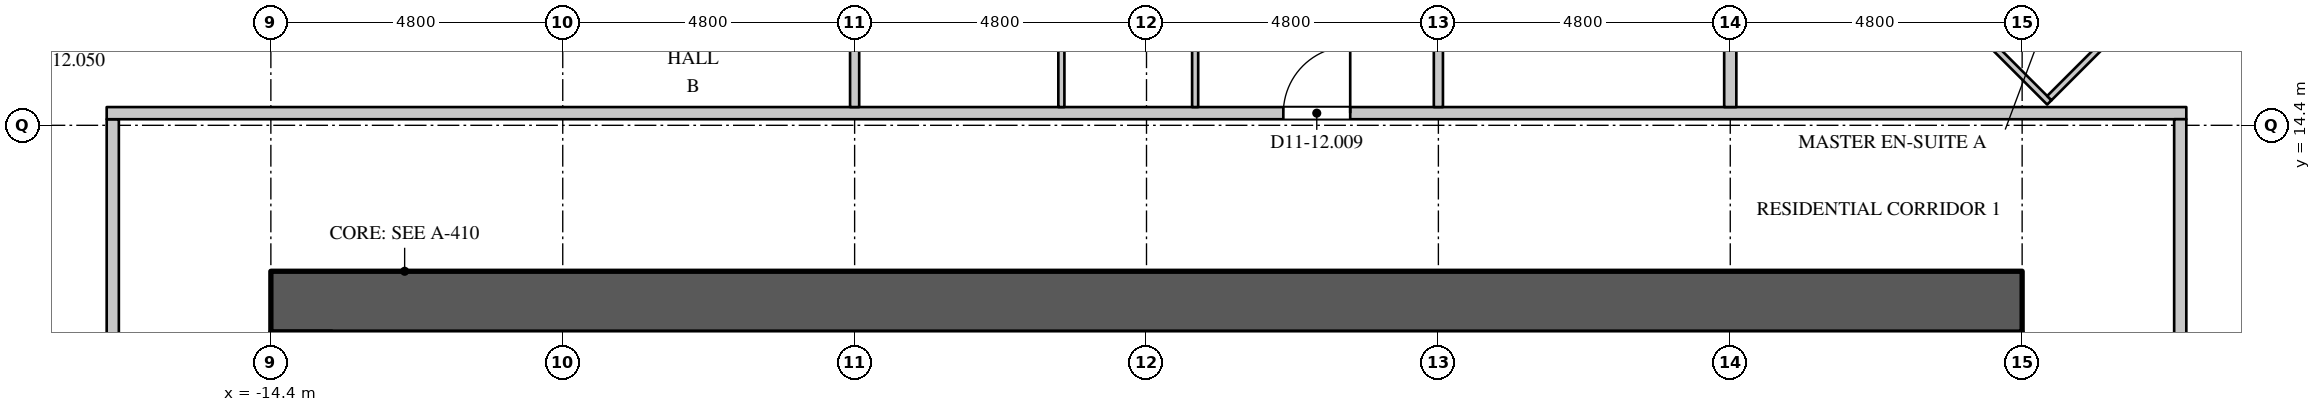
"""IFC4 building model, lengths in metres.
Left out: names, types, materials, properties, quantities, classifications, styles, units other than length and angle.
Written with IfcOpenShell. Run it as: python <this file> out.ifc"""

import sys

from ifc_helpers import new_model, si_unit, direction, frame, frame_2d, origin, place, context, subcontext, project, spatial, rectangle, extrude, element, fill, save


model = new_model("IFC4")
c1 = context("Model", 3, precision=1e-05, world=origin(), true_north=direction((0.0, 1.0)))
c2 = subcontext(c1, "Body", "Model", "MODEL_VIEW")
j1 = project(units=[si_unit("LENGTHUNIT", "METRE"), si_unit("PLANEANGLEUNIT", "RADIAN")], contexts=[c1])
p1 = place(None, origin())
s1 = spatial("IfcSite", under=j1, at=p1, CompositionType="ELEMENT")
p2 = place(p1, origin())
s2 = spatial("IfcBuilding", under=s1, at=p2, CompositionType="ELEMENT")
p3 = place(p2, frame((0.0, 0.0, 50.7)))
s3 = spatial("IfcBuildingStorey", under=s2, at=p3, CompositionType="ELEMENT", Elevation=50.7)
p4 = place(p3, frame((-14.4, 11.5, 0.0), z_axis=(0.0, 0.0, 1.0), x_axis=(1.0, 0.0, 0.0)))
e1 = element("IfcWall", 1, at=p4, inside=s3, PredefinedType="SHEAR", context=c2, shape_type="SweptSolid", body=[
    extrude(rectangle(XDim=28.8, YDim=1.0, at=frame_2d((14.4, 0.0))), origin(), (0.0, 0.0, 1.0), 4.2),
])
p5 = place(p3, frame((-17.0, -14.5, 0.0), z_axis=(0.0, 0.0, 1.0), x_axis=(0.0, 1.0, 0.0)))
e2 = element("IfcWall", 2, at=p5, inside=s3, PredefinedType="PARTITIONING", context=c2, shape_type="SweptSolid", body=[
    extrude(rectangle(XDim=29.0, YDim=0.2, at=frame_2d((14.5, 0.0))), origin(), (0.0, 0.0, 1.0), 3.95),
])
p6 = place(p5, frame((11.55, 0.0, 0.0)))
e3 = element("IfcOpeningElement", 3, at=p6, cuts=e2, PredefinedType="OPENING", context=c2, shape_type="SweptSolid", body=[
    extrude(rectangle(XDim=1.1, YDim=2.4, at=frame_2d((0.55, 1.2))), frame((0.0, 0.11, 0.0), z_axis=(0.0, -1.0, 0.0), x_axis=(1.0, 0.0, 0.0)), (0.0, 0.0, 1.0), 0.22),
])
p7 = place(p3, frame((-17.1, 14.6, 0.0), z_axis=(0.0, 0.0, 1.0), x_axis=(1.0, 0.0, 0.0)))
e4 = element("IfcWall", 4, at=p7, inside=s3, PredefinedType="PARTITIONING", context=c2, shape_type="SweptSolid", body=[
    extrude(rectangle(XDim=34.2, YDim=0.2, at=frame_2d((17.1, 0.0))), origin(), (0.0, 0.0, 1.0), 3.95),
])
p8 = place(p7, frame((19.35, 0.0, 0.0)))
e5 = element("IfcOpeningElement", 5, at=p8, cuts=e4, PredefinedType="OPENING", context=c2, shape_type="SweptSolid", body=[
    extrude(rectangle(XDim=1.1, YDim=2.4, at=frame_2d((0.55, 1.2))), frame((0.0, 0.11, 0.0), z_axis=(0.0, -1.0, 0.0), x_axis=(1.0, 0.0, 0.0)), (0.0, 0.0, 1.0), 0.22),
])
p9 = place(p3, frame((17.0, -14.5, 0.0), z_axis=(0.0, 0.0, 1.0), x_axis=(0.0, 1.0, 0.0)))
e6 = element("IfcWall", 6, at=p9, inside=s3, PredefinedType="PARTITIONING", context=c2, shape_type="SweptSolid", body=[
    extrude(rectangle(XDim=29.0, YDim=0.2, at=frame_2d((14.5, 0.0))), origin(), (0.0, 0.0, 1.0), 3.95),
])
p10 = place(p9, frame((16.4, 0.0, 0.0)))
e7 = element("IfcOpeningElement", 7, at=p10, cuts=e6, PredefinedType="OPENING", context=c2, shape_type="SweptSolid", body=[
    extrude(rectangle(XDim=1.1, YDim=2.4, at=frame_2d((0.55, 1.2))), frame((0.0, 0.11, 0.0), z_axis=(0.0, -1.0, 0.0), x_axis=(1.0, 0.0, 0.0)), (0.0, 0.0, 1.0), 0.22),
])
p11 = place(p3, frame((-22.747, 11.968, 0.0), z_axis=(0.0, 0.0, 1.0), x_axis=(0.707106781187, 0.707106781187, 0.0)))
e8 = element("IfcWall", 8, at=p11, inside=s3, PredefinedType="PARTITIONING", context=c2, shape_type="SweptSolid", body=[
    extrude(rectangle(XDim=9.913, YDim=0.15, at=frame_2d((4.957, 0.0))), origin(), (0.0, 0.0, 1.0), 3.95),
])
p12 = place(p11, frame((4.45, 0.0, 0.0)))
e9 = element("IfcOpeningElement", 9, at=p12, cuts=e8, PredefinedType="OPENING", context=c2, shape_type="SweptSolid", body=[
    extrude(rectangle(XDim=0.95, YDim=2.2, at=frame_2d((0.475, 1.1))), frame((0.0, 0.085, 0.0), z_axis=(0.0, -1.0, 0.0), x_axis=(1.0, 0.0, 0.0)), (0.0, 0.0, 1.0), 0.17),
])
p13 = place(p11, frame((8.35, 0.0, 0.0)))
e10 = element("IfcOpeningElement", 10, at=p13, cuts=e8, PredefinedType="OPENING", context=c2, shape_type="SweptSolid", body=[
    extrude(rectangle(XDim=0.95, YDim=2.2, at=frame_2d((0.475, 1.1))), frame((0.0, 0.085, 0.0), z_axis=(0.0, -1.0, 0.0), x_axis=(1.0, 0.0, 0.0)), (0.0, 0.0, 1.0), 0.17),
])
p14 = place(p3, frame((-4.8, 14.7, 0.0), z_axis=(0.0, 0.0, 1.0), x_axis=(0.0, 1.0, 0.0)))
e11 = element("IfcWall", 11, at=p14, inside=s3, PredefinedType="PARTITIONING", context=c2, shape_type="SweptSolid", body=[
    extrude(rectangle(XDim=4.32, YDim=0.15, at=frame_2d((2.16, 0.0))), origin(), (0.0, 0.0, 1.0), 3.2),
])
p15 = place(p14, frame((1.85, 0.0, 0.0)))
e12 = element("IfcOpeningElement", 12, at=p15, cuts=e11, PredefinedType="OPENING", context=c2, shape_type="SweptSolid", body=[
    extrude(rectangle(XDim=0.95, YDim=2.2, at=frame_2d((0.475, 1.1))), frame((0.0, 0.085, 0.0), z_axis=(0.0, -1.0, 0.0), x_axis=(1.0, 0.0, 0.0)), (0.0, 0.0, 1.0), 0.17),
])
p16 = place(p3, frame((4.8, 14.7, 0.0), z_axis=(0.0, 0.0, 1.0), x_axis=(0.0, 1.0, 0.0)))
e13 = element("IfcWall", 13, at=p16, inside=s3, PredefinedType="PARTITIONING", context=c2, shape_type="SweptSolid", body=[
    extrude(rectangle(XDim=13.2, YDim=0.15, at=frame_2d((6.6, 0.0))), origin(), (0.0, 0.0, 1.0), 3.2),
])
p17 = place(p16, frame((3.0, 0.0, 0.0)))
e14 = element("IfcOpeningElement", 14, at=p17, cuts=e13, PredefinedType="OPENING", context=c2, shape_type="SweptSolid", body=[
    extrude(rectangle(XDim=0.95, YDim=2.2, at=frame_2d((0.475, 1.1))), frame((0.0, 0.085, 0.0), z_axis=(0.0, -1.0, 0.0), x_axis=(1.0, 0.0, 0.0)), (0.0, 0.0, 1.0), 0.17),
])
p18 = place(p3, frame((17.693, 17.587, 0.0), z_axis=(0.0, 0.0, 1.0), x_axis=(0.707106781187, -0.707106781187, 0.0)))
e15 = element("IfcWall", 15, at=p18, inside=s3, PredefinedType="PARTITIONING", context=c2, shape_type="SweptSolid", body=[
    extrude(rectangle(XDim=7.863, YDim=0.15, at=frame_2d((3.931, 0.0))), origin(), (0.0, 0.0, 1.0), 3.95),
])
p19 = place(p18, frame((2.05, 0.0, 0.0)))
e16 = element("IfcOpeningElement", 16, at=p19, cuts=e15, PredefinedType="OPENING", context=c2, shape_type="SweptSolid", body=[
    extrude(rectangle(XDim=0.95, YDim=2.2, at=frame_2d((0.475, 1.1))), frame((0.0, 0.085, 0.0), z_axis=(0.0, -1.0, 0.0), x_axis=(1.0, 0.0, 0.0)), (0.0, 0.0, 1.0), 0.17),
])
p20 = place(p18, frame((6.7, 0.0, 0.0)))
e17 = element("IfcOpeningElement", 17, at=p20, cuts=e15, PredefinedType="OPENING", context=c2, shape_type="SweptSolid", body=[
    extrude(rectangle(XDim=0.95, YDim=2.2, at=frame_2d((0.475, 1.1))), frame((0.0, 0.085, 0.0), z_axis=(0.0, -1.0, 0.0), x_axis=(1.0, 0.0, 0.0)), (0.0, 0.0, 1.0), 0.17),
])
p21 = place(p3, frame((9.6, 14.7, 0.0), z_axis=(0.0, 0.0, 1.0), x_axis=(0.0, 1.0, 0.0)))
e18 = element("IfcWall", 18, at=p21, inside=s3, PredefinedType="PARTITIONING", context=c2, shape_type="SweptSolid", body=[
    extrude(rectangle(XDim=14.155, YDim=0.2, at=frame_2d((7.078, 0.0))), origin(), (0.0, 0.0, 1.0), 3.95),
])
p22 = place(p3, frame((-1.4, 14.7, 0.0), z_axis=(0.0, 0.0, 1.0), x_axis=(0.0, 1.0, 0.0)))
e19 = element("IfcWall", 19, at=p22, inside=s3, PredefinedType="PARTITIONING", context=c2, shape_type="SweptSolid", body=[
    extrude(rectangle(XDim=7.025, YDim=0.1, at=frame_2d((3.513, 0.0))), origin(), (0.0, 0.0, 1.0), 3.95),
])
p23 = place(p3, frame((0.8, 14.7, 0.0), z_axis=(0.0, 0.0, 1.0), x_axis=(0.0, 1.0, 0.0)))
e20 = element("IfcWall", 20, at=p23, inside=s3, PredefinedType="PARTITIONING", context=c2, shape_type="SweptSolid", body=[
    extrude(rectangle(XDim=7.025, YDim=0.1, at=frame_2d((3.513, 0.0))), origin(), (0.0, 0.0, 1.0), 3.95),
])
p24 = place(p23, frame((3.05, 0.0, 0.0)))
e21 = element("IfcOpeningElement", 21, at=p24, cuts=e20, PredefinedType="OPENING", context=c2, shape_type="SweptSolid", body=[
    extrude(rectangle(XDim=0.9, YDim=2.2, at=frame_2d((0.45, 1.1))), frame((0.0, 0.06, 0.0), z_axis=(0.0, -1.0, 0.0), x_axis=(1.0, 0.0, 0.0)), (0.0, 0.0, 1.0), 0.12),
])
p25 = place(p3, frame((12.938, 16.686, 0.0), z_axis=(0.0, 0.0, 1.0), x_axis=(0.707106781187, -0.707106781187, 0.0)))
e22 = element("IfcWall", 22, at=p25, inside=s3, PredefinedType="PARTITIONING", context=c2, shape_type="SweptSolid", body=[
    extrude(rectangle(XDim=2.7, YDim=0.1, at=frame_2d((1.35, 0.0))), origin(), (0.0, 0.0, 1.0), 3.95),
])
p26 = place(p3, frame((14.847, 14.847, 0.0), z_axis=(0.0, 0.0, 1.0), x_axis=(0.707106781187, 0.707106781187, 0.0)))
e23 = element("IfcWall", 23, at=p26, inside=s3, PredefinedType="PARTITIONING", context=c2, shape_type="SweptSolid", body=[
    extrude(rectangle(XDim=3.33, YDim=0.1, at=frame_2d((1.665, 0.0))), origin(), (0.0, 0.0, 1.0), 3.95),
])
p27 = place(p8, origin())
e24 = element("IfcDoor", 24, at=p27, inside=s3, OperationType="SINGLE_SWING_RIGHT", PredefinedType="DOOR", context=c2, shape_type="SweptSolid", body=[
    extrude(rectangle(XDim=1.1, YDim=2.4, at=frame_2d((0.55, 1.2))), frame((0.0, 0.025, 0.0), z_axis=(0.0, -1.0, 0.0), x_axis=(1.0, 0.0, 0.0)), (0.0, 0.0, 1.0), 0.05),
])
fill(e5, e24)
save(model, sys.argv[1])
